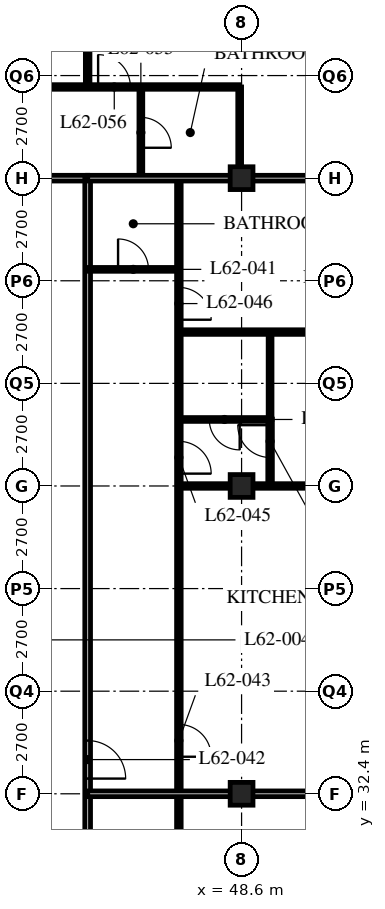
"""IFC4 building model, lengths in metres.
Left out: names, types, materials, properties, quantities, classifications, styles, units other than length and angle.
Written with IfcOpenShell. Run it as: python <this file> out.ifc"""

import sys

from ifc_helpers import new_model, si_unit, direction, frame, frame_2d, origin, origin_2d, place, context, subcontext, project, spatial, rectangle, hollow_rectangle, extrude, element, fill, save


model = new_model("IFC4")
c1 = context("Model", 3, precision=1e-05, world=origin(), true_north=direction((0.0, 1.0)))
c2 = subcontext(c1, "Body", "Model", "MODEL_VIEW")
j1 = project(units=[si_unit("LENGTHUNIT", "METRE"), si_unit("PLANEANGLEUNIT", "RADIAN")], contexts=[c1])
p1 = place(None, origin())
s1 = spatial("IfcSite", under=j1, at=p1, CompositionType="ELEMENT")
p2 = place(p1, origin())
s2 = spatial("IfcBuilding", under=s1, at=p2, CompositionType="ELEMENT")
p3 = place(p2, frame((0.0, 0.0, 242.4)))
s3 = spatial("IfcBuildingStorey", under=s2, at=p3, CompositionType="ELEMENT", Elevation=242.4)
for number, where, z_axis, x_axis in (
    (1, (48.6, 32.4, 0.0), (0.0, 0.0, 1.0), (1.0, 0.0, 0.0)),
    (2, (48.6, 40.5, 0.0), (0.0, 0.0, 1.0), (1.0, 0.0, 0.0)),
    (3, (48.6, 48.6, 0.0), (0.0, 0.0, 1.0), (1.0, 0.0, 0.0)),
):
    element("IfcColumn", number, at=place(p3, frame(where, z_axis=z_axis, x_axis=x_axis)), inside=s3, PredefinedType="COLUMN", context=c2, shape_type="SweptSolid", body=[
        extrude(hollow_rectangle(XDim=0.6, YDim=0.6, WallThickness=0.05, at=origin_2d()), origin(), (0.0, 0.0, 1.0), 3.9),
    ])
p4 = place(p3, frame((12.15, 48.6, 0.0), z_axis=(0.0, 0.0, 1.0), x_axis=(1.0, 0.0, 0.0)))
e4 = element("IfcWall", 4, at=p4, inside=s3, PredefinedType="PARTITIONING", context=c2, shape_type="SweptSolid", body=[
    extrude(rectangle(XDim=32.4, YDim=0.15, at=frame_2d((16.2, 0.0))), origin(), (0.0, 0.0, 1.0), 2.928),
])
p5 = place(p4, frame((4.95, 0.0, 0.0)))
e5 = element("IfcOpeningElement", 5, at=p5, cuts=e4, PredefinedType="OPENING", context=c2, shape_type="SweptSolid", body=[
    extrude(rectangle(XDim=1.0, YDim=2.1, at=frame_2d((0.5, 1.05))), frame((0.0, 0.085, 0.0), z_axis=(0.0, -1.0, 0.0), x_axis=(1.0, 0.0, 0.0)), (0.0, 0.0, 1.0), 0.17),
])
p6 = place(p4, frame((21.15, 0.0, 0.0)))
e6 = element("IfcOpeningElement", 6, at=p6, cuts=e4, PredefinedType="OPENING", context=c2, shape_type="SweptSolid", body=[
    extrude(rectangle(XDim=1.0, YDim=2.1, at=frame_2d((0.5, 1.05))), frame((0.0, 0.085, 0.0), z_axis=(0.0, -1.0, 0.0), x_axis=(1.0, 0.0, 0.0)), (0.0, 0.0, 1.0), 0.17),
])
p7 = place(p4, frame((29.875, 0.0, 0.0)))
e7 = element("IfcOpeningElement", 7, at=p7, cuts=e4, PredefinedType="OPENING", context=c2, shape_type="SweptSolid", body=[
    extrude(rectangle(XDim=1.0, YDim=2.1, at=frame_2d((0.5, 1.05))), frame((0.0, 0.085, 0.0), z_axis=(0.0, -1.0, 0.0), x_axis=(1.0, 0.0, 0.0)), (0.0, 0.0, 1.0), 0.17),
])
p8 = place(p4, frame((1.525, 0.0, 0.0)))
e8 = element("IfcOpeningElement", 8, at=p8, cuts=e4, PredefinedType="OPENING", context=c2, shape_type="SweptSolid", body=[
    extrude(rectangle(XDim=1.0, YDim=2.1, at=frame_2d((0.5, 1.05))), frame((0.0, 0.085, 0.0), z_axis=(0.0, -1.0, 0.0), x_axis=(1.0, 0.0, 0.0)), (0.0, 0.0, 1.0), 0.17),
])
p9 = place(p3, frame((44.55, 22.5, 0.0), z_axis=(0.0, 0.0, 1.0), x_axis=(0.0, 1.0, 0.0)))
e9 = element("IfcWall", 9, at=p9, inside=s3, PredefinedType="PARTITIONING", context=c2, shape_type="SweptSolid", body=[
    extrude(rectangle(XDim=26.1, YDim=0.15, at=frame_2d((13.05, 0.0))), origin(), (0.0, 0.0, 1.0), 3.69),
])
p10 = place(p9, frame((0.4, 0.0, 0.0)))
e10 = element("IfcOpeningElement", 10, at=p10, cuts=e9, PredefinedType="OPENING", context=c2, shape_type="SweptSolid", body=[
    extrude(rectangle(XDim=1.0, YDim=2.1, at=frame_2d((0.5, 1.05))), frame((0.0, 0.085, 0.0), z_axis=(0.0, -1.0, 0.0), x_axis=(1.0, 0.0, 0.0)), (0.0, 0.0, 1.0), 0.17),
])
p11 = place(p9, frame((10.3, 0.0, 0.0)))
e11 = element("IfcOpeningElement", 11, at=p11, cuts=e9, PredefinedType="OPENING", context=c2, shape_type="SweptSolid", body=[
    extrude(rectangle(XDim=1.0, YDim=2.1, at=frame_2d((0.5, 1.05))), frame((0.0, 0.085, 0.0), z_axis=(0.0, -1.0, 0.0), x_axis=(1.0, 0.0, 0.0)), (0.0, 0.0, 1.0), 0.17),
])
p12 = place(p3, frame((46.95, 22.5, 0.0), z_axis=(0.0, 0.0, 1.0), x_axis=(0.0, 1.0, 0.0)))
e12 = element("IfcWall", 12, at=p12, inside=s3, PredefinedType="PARTITIONING", context=c2, shape_type="SweptSolid", body=[
    extrude(rectangle(XDim=26.1, YDim=0.12, at=frame_2d((13.05, 0.0))), origin(), (0.0, 0.0, 1.0), 3.69),
])
p13 = place(p12, frame((0.975, 0.0, 0.0)))
e13 = element("IfcOpeningElement", 13, at=p13, cuts=e12, PredefinedType="OPENING", context=c2, shape_type="SweptSolid", body=[
    extrude(rectangle(XDim=0.85, YDim=2.1, at=frame_2d((0.425, 1.05))), frame((0.0, 0.07, 0.0), z_axis=(0.0, -1.0, 0.0), x_axis=(1.0, 0.0, 0.0)), (0.0, 0.0, 1.0), 0.14),
])
p14 = place(p12, frame((6.175, 0.0, 0.0)))
e14 = element("IfcOpeningElement", 14, at=p14, cuts=e12, PredefinedType="OPENING", context=c2, shape_type="SweptSolid", body=[
    extrude(rectangle(XDim=0.85, YDim=2.1, at=frame_2d((0.425, 1.05))), frame((0.0, 0.07, 0.0), z_axis=(0.0, -1.0, 0.0), x_axis=(1.0, 0.0, 0.0)), (0.0, 0.0, 1.0), 0.14),
])
p15 = place(p12, frame((10.875, 0.0, 0.0)))
e15 = element("IfcOpeningElement", 15, at=p15, cuts=e12, PredefinedType="OPENING", context=c2, shape_type="SweptSolid", body=[
    extrude(rectangle(XDim=0.85, YDim=2.1, at=frame_2d((0.425, 1.05))), frame((0.0, 0.07, 0.0), z_axis=(0.0, -1.0, 0.0), x_axis=(1.0, 0.0, 0.0)), (0.0, 0.0, 1.0), 0.14),
])
p16 = place(p12, frame((18.325, 0.0, 0.0)))
e16 = element("IfcOpeningElement", 16, at=p16, cuts=e12, PredefinedType="OPENING", context=c2, shape_type="SweptSolid", body=[
    extrude(rectangle(XDim=0.85, YDim=2.1, at=frame_2d((0.425, 1.05))), frame((0.0, 0.07, 0.0), z_axis=(0.0, -1.0, 0.0), x_axis=(1.0, 0.0, 0.0)), (0.0, 0.0, 1.0), 0.14),
])
p17 = place(p12, frame((22.375, 0.0, 0.0)))
e17 = element("IfcOpeningElement", 17, at=p17, cuts=e12, PredefinedType="OPENING", context=c2, shape_type="SweptSolid", body=[
    extrude(rectangle(XDim=0.85, YDim=2.1, at=frame_2d((0.425, 1.05))), frame((0.0, 0.07, 0.0), z_axis=(0.0, -1.0, 0.0), x_axis=(1.0, 0.0, 0.0)), (0.0, 0.0, 1.0), 0.14),
])
p18 = place(p3, frame((44.55, 32.4, 0.0), z_axis=(0.0, 0.0, 1.0), x_axis=(1.0, 0.0, 0.0)))
e18 = element("IfcWall", 18, at=p18, inside=s3, PredefinedType="PARTITIONING", context=c2, shape_type="SweptSolid", body=[
    extrude(rectangle(XDim=11.85, YDim=0.15, at=frame_2d((5.925, 0.0))), origin(), (0.0, 0.0, 1.0), 2.928),
])
p19 = place(p3, frame((44.55, 46.2, 0.0), z_axis=(0.0, 0.0, 1.0), x_axis=(1.0, 0.0, 0.0)))
e19 = element("IfcWall", 19, at=p19, inside=s3, PredefinedType="PARTITIONING", context=c2, shape_type="SweptSolid", body=[
    extrude(rectangle(XDim=2.4, YDim=0.1, at=frame_2d((1.2, 0.0))), origin(), (0.0, 0.0, 1.0), 3.69),
])
p20 = place(p19, frame((0.8, 0.0, 0.0)))
e20 = element("IfcOpeningElement", 20, at=p20, cuts=e19, PredefinedType="OPENING", context=c2, shape_type="SweptSolid", body=[
    extrude(rectangle(XDim=0.8, YDim=2.1, at=frame_2d((0.4, 1.05))), frame((0.0, 0.06, 0.0), z_axis=(0.0, -1.0, 0.0), x_axis=(1.0, 0.0, 0.0)), (0.0, 0.0, 1.0), 0.12),
])
p21 = place(p3, frame((46.95, 42.25, 0.0), z_axis=(0.0, 0.0, 1.0), x_axis=(1.0, 0.0, 0.0)))
e21 = element("IfcWall", 21, at=p21, inside=s3, PredefinedType="PARTITIONING", context=c2, shape_type="SweptSolid", body=[
    extrude(rectangle(XDim=2.4, YDim=0.1, at=frame_2d((1.2, 0.0))), origin(), (0.0, 0.0, 1.0), 3.69),
])
p22 = place(p21, frame((0.8, 0.0, 0.0)))
e22 = element("IfcOpeningElement", 22, at=p22, cuts=e21, PredefinedType="OPENING", context=c2, shape_type="SweptSolid", body=[
    extrude(rectangle(XDim=0.8, YDim=2.1, at=frame_2d((0.4, 1.05))), frame((0.0, 0.06, 0.0), z_axis=(0.0, -1.0, 0.0), x_axis=(1.0, 0.0, 0.0)), (0.0, 0.0, 1.0), 0.12),
])
p23 = place(p3, frame((49.35, 42.25, 0.0), z_axis=(0.0, 0.0, 1.0), x_axis=(0.0, 1.0, 0.0)))
e23 = element("IfcWall", 23, at=p23, inside=s3, PredefinedType="PARTITIONING", context=c2, shape_type="SweptSolid", body=[
    extrude(rectangle(XDim=2.3, YDim=0.1, at=frame_2d((1.15, 0.0))), origin(), (0.0, 0.0, 1.0), 3.69),
])
p24 = place(p3, frame((46.95, 40.5, 0.0), z_axis=(0.0, 0.0, 1.0), x_axis=(1.0, 0.0, 0.0)))
e24 = element("IfcWall", 24, at=p24, inside=s3, PredefinedType="PARTITIONING", context=c2, shape_type="SweptSolid", body=[
    extrude(rectangle(XDim=9.45, YDim=0.12, at=frame_2d((4.725, 0.0))), origin(), (0.0, 0.0, 1.0), 2.928),
])
p25 = place(p3, frame((46.95, 44.55, 0.0), z_axis=(0.0, 0.0, 1.0), x_axis=(1.0, 0.0, 0.0)))
e25 = element("IfcWall", 25, at=p25, inside=s3, PredefinedType="PARTITIONING", context=c2, shape_type="SweptSolid", body=[
    extrude(rectangle(XDim=9.45, YDim=0.12, at=frame_2d((4.725, 0.0))), origin(), (0.0, 0.0, 1.0), 3.69),
])
p26 = place(p3, frame((45.95, 48.6, 0.0), z_axis=(0.0, 0.0, 1.0), x_axis=(0.0, 1.0, 0.0)))
e26 = element("IfcWall", 26, at=p26, inside=s3, PredefinedType="PARTITIONING", context=c2, shape_type="SweptSolid", body=[
    extrude(rectangle(XDim=2.4, YDim=0.1, at=frame_2d((1.2, 0.0))), origin(), (0.0, 0.0, 1.0), 3.69),
])
p27 = place(p26, frame((0.8, 0.0, 0.0)))
e27 = element("IfcOpeningElement", 27, at=p27, cuts=e26, PredefinedType="OPENING", context=c2, shape_type="SweptSolid", body=[
    extrude(rectangle(XDim=0.8, YDim=2.1, at=frame_2d((0.4, 1.05))), frame((0.0, 0.06, 0.0), z_axis=(0.0, -1.0, 0.0), x_axis=(1.0, 0.0, 0.0)), (0.0, 0.0, 1.0), 0.12),
])
p28 = place(p3, frame((48.55, 48.6, 0.0), z_axis=(0.0, 0.0, 1.0), x_axis=(0.0, 1.0, 0.0)))
e28 = element("IfcWall", 28, at=p28, inside=s3, PredefinedType="PARTITIONING", context=c2, shape_type="SweptSolid", body=[
    extrude(rectangle(XDim=2.4, YDim=0.1, at=frame_2d((1.2, 0.0))), origin(), (0.0, 0.0, 1.0), 2.928),
])
p29 = place(p3, frame((44.55, 51.0, 0.0), z_axis=(0.0, 0.0, 1.0), x_axis=(0.0, 1.0, 0.0)))
e29 = element("IfcWall", 29, at=p29, inside=s3, PredefinedType="PARTITIONING", context=c2, shape_type="SweptSolid", body=[
    extrude(rectangle(XDim=13.5, YDim=0.12, at=frame_2d((6.75, 0.0))), origin(), (0.0, 0.0, 1.0), 3.69),
])
p30 = place(p3, frame((44.55, 48.6, 0.0), z_axis=(0.0, 0.0, 1.0), x_axis=(1.0, 0.0, 0.0)))
e30 = element("IfcWall", 30, at=p30, inside=s3, PredefinedType="PARTITIONING", context=c2, shape_type="SweptSolid", body=[
    extrude(rectangle(XDim=11.85, YDim=0.15, at=frame_2d((5.925, 0.0))), origin(), (0.0, 0.0, 1.0), 2.928),
])
p31 = place(p3, frame((8.15, 51.0, 0.0), z_axis=(0.0, 0.0, 1.0), x_axis=(1.0, 0.0, 0.0)))
e31 = element("IfcWall", 31, at=p31, inside=s3, PredefinedType="PARTITIONING", context=c2, shape_type="SweptSolid", body=[
    extrude(rectangle(XDim=40.4, YDim=0.12, at=frame_2d((20.2, 0.0))), origin(), (0.0, 0.0, 1.0), 3.69),
])
p32 = place(p31, frame((9.025, 0.0, 0.0)))
e32 = element("IfcOpeningElement", 32, at=p32, cuts=e31, PredefinedType="OPENING", context=c2, shape_type="SweptSolid", body=[
    extrude(rectangle(XDim=0.85, YDim=2.1, at=frame_2d((0.425, 1.05))), frame((0.0, 0.07, 0.0), z_axis=(0.0, -1.0, 0.0), x_axis=(1.0, 0.0, 0.0)), (0.0, 0.0, 1.0), 0.14),
])
p33 = place(p31, frame((16.475, 0.0, 0.0)))
e33 = element("IfcOpeningElement", 33, at=p33, cuts=e31, PredefinedType="OPENING", context=c2, shape_type="SweptSolid", body=[
    extrude(rectangle(XDim=0.85, YDim=2.1, at=frame_2d((0.425, 1.05))), frame((0.0, 0.07, 0.0), z_axis=(0.0, -1.0, 0.0), x_axis=(1.0, 0.0, 0.0)), (0.0, 0.0, 1.0), 0.14),
])
p34 = place(p31, frame((20.525, 0.0, 0.0)))
e34 = element("IfcOpeningElement", 34, at=p34, cuts=e31, PredefinedType="OPENING", context=c2, shape_type="SweptSolid", body=[
    extrude(rectangle(XDim=0.85, YDim=2.1, at=frame_2d((0.425, 1.05))), frame((0.0, 0.07, 0.0), z_axis=(0.0, -1.0, 0.0), x_axis=(1.0, 0.0, 0.0)), (0.0, 0.0, 1.0), 0.14),
])
p35 = place(p31, frame((25.225, 0.0, 0.0)))
e35 = element("IfcOpeningElement", 35, at=p35, cuts=e31, PredefinedType="OPENING", context=c2, shape_type="SweptSolid", body=[
    extrude(rectangle(XDim=0.85, YDim=2.1, at=frame_2d((0.425, 1.05))), frame((0.0, 0.07, 0.0), z_axis=(0.0, -1.0, 0.0), x_axis=(1.0, 0.0, 0.0)), (0.0, 0.0, 1.0), 0.14),
])
p36 = place(p31, frame((28.625, 0.0, 0.0)))
e36 = element("IfcOpeningElement", 36, at=p36, cuts=e31, PredefinedType="OPENING", context=c2, shape_type="SweptSolid", body=[
    extrude(rectangle(XDim=0.85, YDim=2.1, at=frame_2d((0.425, 1.05))), frame((0.0, 0.07, 0.0), z_axis=(0.0, -1.0, 0.0), x_axis=(1.0, 0.0, 0.0)), (0.0, 0.0, 1.0), 0.14),
])
p37 = place(p31, frame((32.825, 0.0, 0.0)))
e37 = element("IfcOpeningElement", 37, at=p37, cuts=e31, PredefinedType="OPENING", context=c2, shape_type="SweptSolid", body=[
    extrude(rectangle(XDim=0.85, YDim=2.1, at=frame_2d((0.425, 1.05))), frame((0.0, 0.07, 0.0), z_axis=(0.0, -1.0, 0.0), x_axis=(1.0, 0.0, 0.0)), (0.0, 0.0, 1.0), 0.14),
])
p38 = place(p31, frame((36.675, 0.0, 0.0)))
e38 = element("IfcOpeningElement", 38, at=p38, cuts=e31, PredefinedType="OPENING", context=c2, shape_type="SweptSolid", body=[
    extrude(rectangle(XDim=0.85, YDim=2.1, at=frame_2d((0.425, 1.05))), frame((0.0, 0.07, 0.0), z_axis=(0.0, -1.0, 0.0), x_axis=(1.0, 0.0, 0.0)), (0.0, 0.0, 1.0), 0.14),
])
p39 = place(p31, frame((6.725, 0.0, 0.0)))
e39 = element("IfcOpeningElement", 39, at=p39, cuts=e31, PredefinedType="OPENING", context=c2, shape_type="SweptSolid", body=[
    extrude(rectangle(XDim=0.85, YDim=2.1, at=frame_2d((0.425, 1.05))), frame((0.0, 0.07, 0.0), z_axis=(0.0, -1.0, 0.0), x_axis=(1.0, 0.0, 0.0)), (0.0, 0.0, 1.0), 0.14),
])
p40 = place(p31, frame((2.875, 0.0, 0.0)))
e40 = element("IfcOpeningElement", 40, at=p40, cuts=e31, PredefinedType="OPENING", context=c2, shape_type="SweptSolid", body=[
    extrude(rectangle(XDim=0.85, YDim=2.1, at=frame_2d((0.425, 1.05))), frame((0.0, 0.07, 0.0), z_axis=(0.0, -1.0, 0.0), x_axis=(1.0, 0.0, 0.0)), (0.0, 0.0, 1.0), 0.14),
])
p41 = place(p3, frame((49.35, 42.26, 0.0), z_axis=(0.0, 0.0, 1.0), x_axis=(0.0, -1.0, 0.0)))
e41 = element("IfcWall", 41, at=p41, inside=s3, PredefinedType="PARTITIONING", context=c2, shape_type="SweptSolid", body=[
    extrude(rectangle(XDim=1.76, YDim=0.12, at=frame_2d((0.88, 0.0))), origin(), (0.0, 0.0, 1.0), 3.69),
])
p42 = place(p41, frame((0.16, 0.0, 0.0)))
e42 = element("IfcOpeningElement", 42, at=p42, cuts=e41, PredefinedType="OPENING", context=c2, shape_type="SweptSolid", body=[
    extrude(rectangle(XDim=0.85, YDim=2.1, at=frame_2d((0.425, 1.05))), frame((0.0, 0.07, 0.0), z_axis=(0.0, -1.0, 0.0), x_axis=(1.0, 0.0, 0.0)), (0.0, 0.0, 1.0), 0.14),
])
p43 = place(p20, origin())
e43 = element("IfcDoor", 43, at=p43, inside=s3, OperationType="SINGLE_SWING_LEFT", PredefinedType="DOOR", context=c2, shape_type="SweptSolid", body=[
    extrude(rectangle(XDim=0.8, YDim=2.1, at=frame_2d((0.4, 1.05))), frame((0.0, 0.025, 0.0), z_axis=(0.0, -1.0, 0.0), x_axis=(1.0, 0.0, 0.0)), (0.0, 0.0, 1.0), 0.05),
])
fill(e20, e43)
p44 = place(p11, origin())
e44 = element("IfcDoor", 44, at=p44, inside=s3, OperationType="SINGLE_SWING_RIGHT", PredefinedType="DOOR", context=c2, shape_type="SweptSolid", body=[
    extrude(rectangle(XDim=1.0, YDim=2.1, at=frame_2d((0.5, 1.05))), frame((0.0, 0.025, 0.0), z_axis=(0.0, -1.0, 0.0), x_axis=(1.0, 0.0, 0.0)), (0.0, 0.0, 1.0), 0.05),
])
fill(e11, e44)
p45 = place(p15, origin())
e45 = element("IfcDoor", 45, at=p45, inside=s3, OperationType="SINGLE_SWING_RIGHT", PredefinedType="DOOR", context=c2, shape_type="SweptSolid", body=[
    extrude(rectangle(XDim=0.85, YDim=2.1, at=frame_2d((0.425, 1.05))), frame((0.0, 0.025, 0.0), z_axis=(0.0, -1.0, 0.0), x_axis=(1.0, 0.0, 0.0)), (0.0, 0.0, 1.0), 0.05),
])
fill(e15, e45)
p46 = place(p22, origin())
e46 = element("IfcDoor", 46, at=p46, inside=s3, OperationType="SINGLE_SWING_LEFT", PredefinedType="DOOR", context=c2, shape_type="SweptSolid", body=[
    extrude(rectangle(XDim=0.8, YDim=2.1, at=frame_2d((0.4, 1.05))), frame((0.0, 0.025, 0.0), z_axis=(0.0, -1.0, 0.0), x_axis=(1.0, 0.0, 0.0)), (0.0, 0.0, 1.0), 0.05),
])
fill(e22, e46)
p47 = place(p16, origin())
e47 = element("IfcDoor", 47, at=p47, inside=s3, OperationType="SINGLE_SWING_RIGHT", PredefinedType="DOOR", context=c2, shape_type="SweptSolid", body=[
    extrude(rectangle(XDim=0.85, YDim=2.1, at=frame_2d((0.425, 1.05))), frame((0.0, 0.025, 0.0), z_axis=(0.0, -1.0, 0.0), x_axis=(1.0, 0.0, 0.0)), (0.0, 0.0, 1.0), 0.05),
])
fill(e16, e47)
p48 = place(p17, origin())
e48 = element("IfcDoor", 48, at=p48, inside=s3, OperationType="SINGLE_SWING_RIGHT", PredefinedType="DOOR", context=c2, shape_type="SweptSolid", body=[
    extrude(rectangle(XDim=0.85, YDim=2.1, at=frame_2d((0.425, 1.05))), frame((0.0, 0.025, 0.0), z_axis=(0.0, -1.0, 0.0), x_axis=(1.0, 0.0, 0.0)), (0.0, 0.0, 1.0), 0.05),
])
fill(e17, e48)
p49 = place(p27, origin())
e49 = element("IfcDoor", 49, at=p49, inside=s3, OperationType="SINGLE_SWING_RIGHT", PredefinedType="DOOR", context=c2, shape_type="SweptSolid", body=[
    extrude(rectangle(XDim=0.8, YDim=2.1, at=frame_2d((0.4, 1.05))), frame((0.0, 0.025, 0.0), z_axis=(0.0, -1.0, 0.0), x_axis=(1.0, 0.0, 0.0)), (0.0, 0.0, 1.0), 0.05),
])
fill(e27, e49)
p50 = place(p38, origin())
e50 = element("IfcDoor", 50, at=p50, inside=s3, OperationType="SINGLE_SWING_LEFT", PredefinedType="DOOR", context=c2, shape_type="SweptSolid", body=[
    extrude(rectangle(XDim=0.85, YDim=2.1, at=frame_2d((0.425, 1.05))), frame((0.0, 0.025, 0.0), z_axis=(0.0, -1.0, 0.0), x_axis=(1.0, 0.0, 0.0)), (0.0, 0.0, 1.0), 0.05),
])
fill(e38, e50)
p51 = place(p42, origin())
e51 = element("IfcDoor", 51, at=p51, inside=s3, OperationType="SINGLE_SWING_RIGHT", PredefinedType="DOOR", context=c2, shape_type="SweptSolid", body=[
    extrude(rectangle(XDim=0.85, YDim=2.1, at=frame_2d((0.425, 1.05))), frame((0.0, 0.025, 0.0), z_axis=(0.0, -1.0, 0.0), x_axis=(1.0, 0.0, 0.0)), (0.0, 0.0, 1.0), 0.05),
])
fill(e42, e51)
save(model, sys.argv[1])
